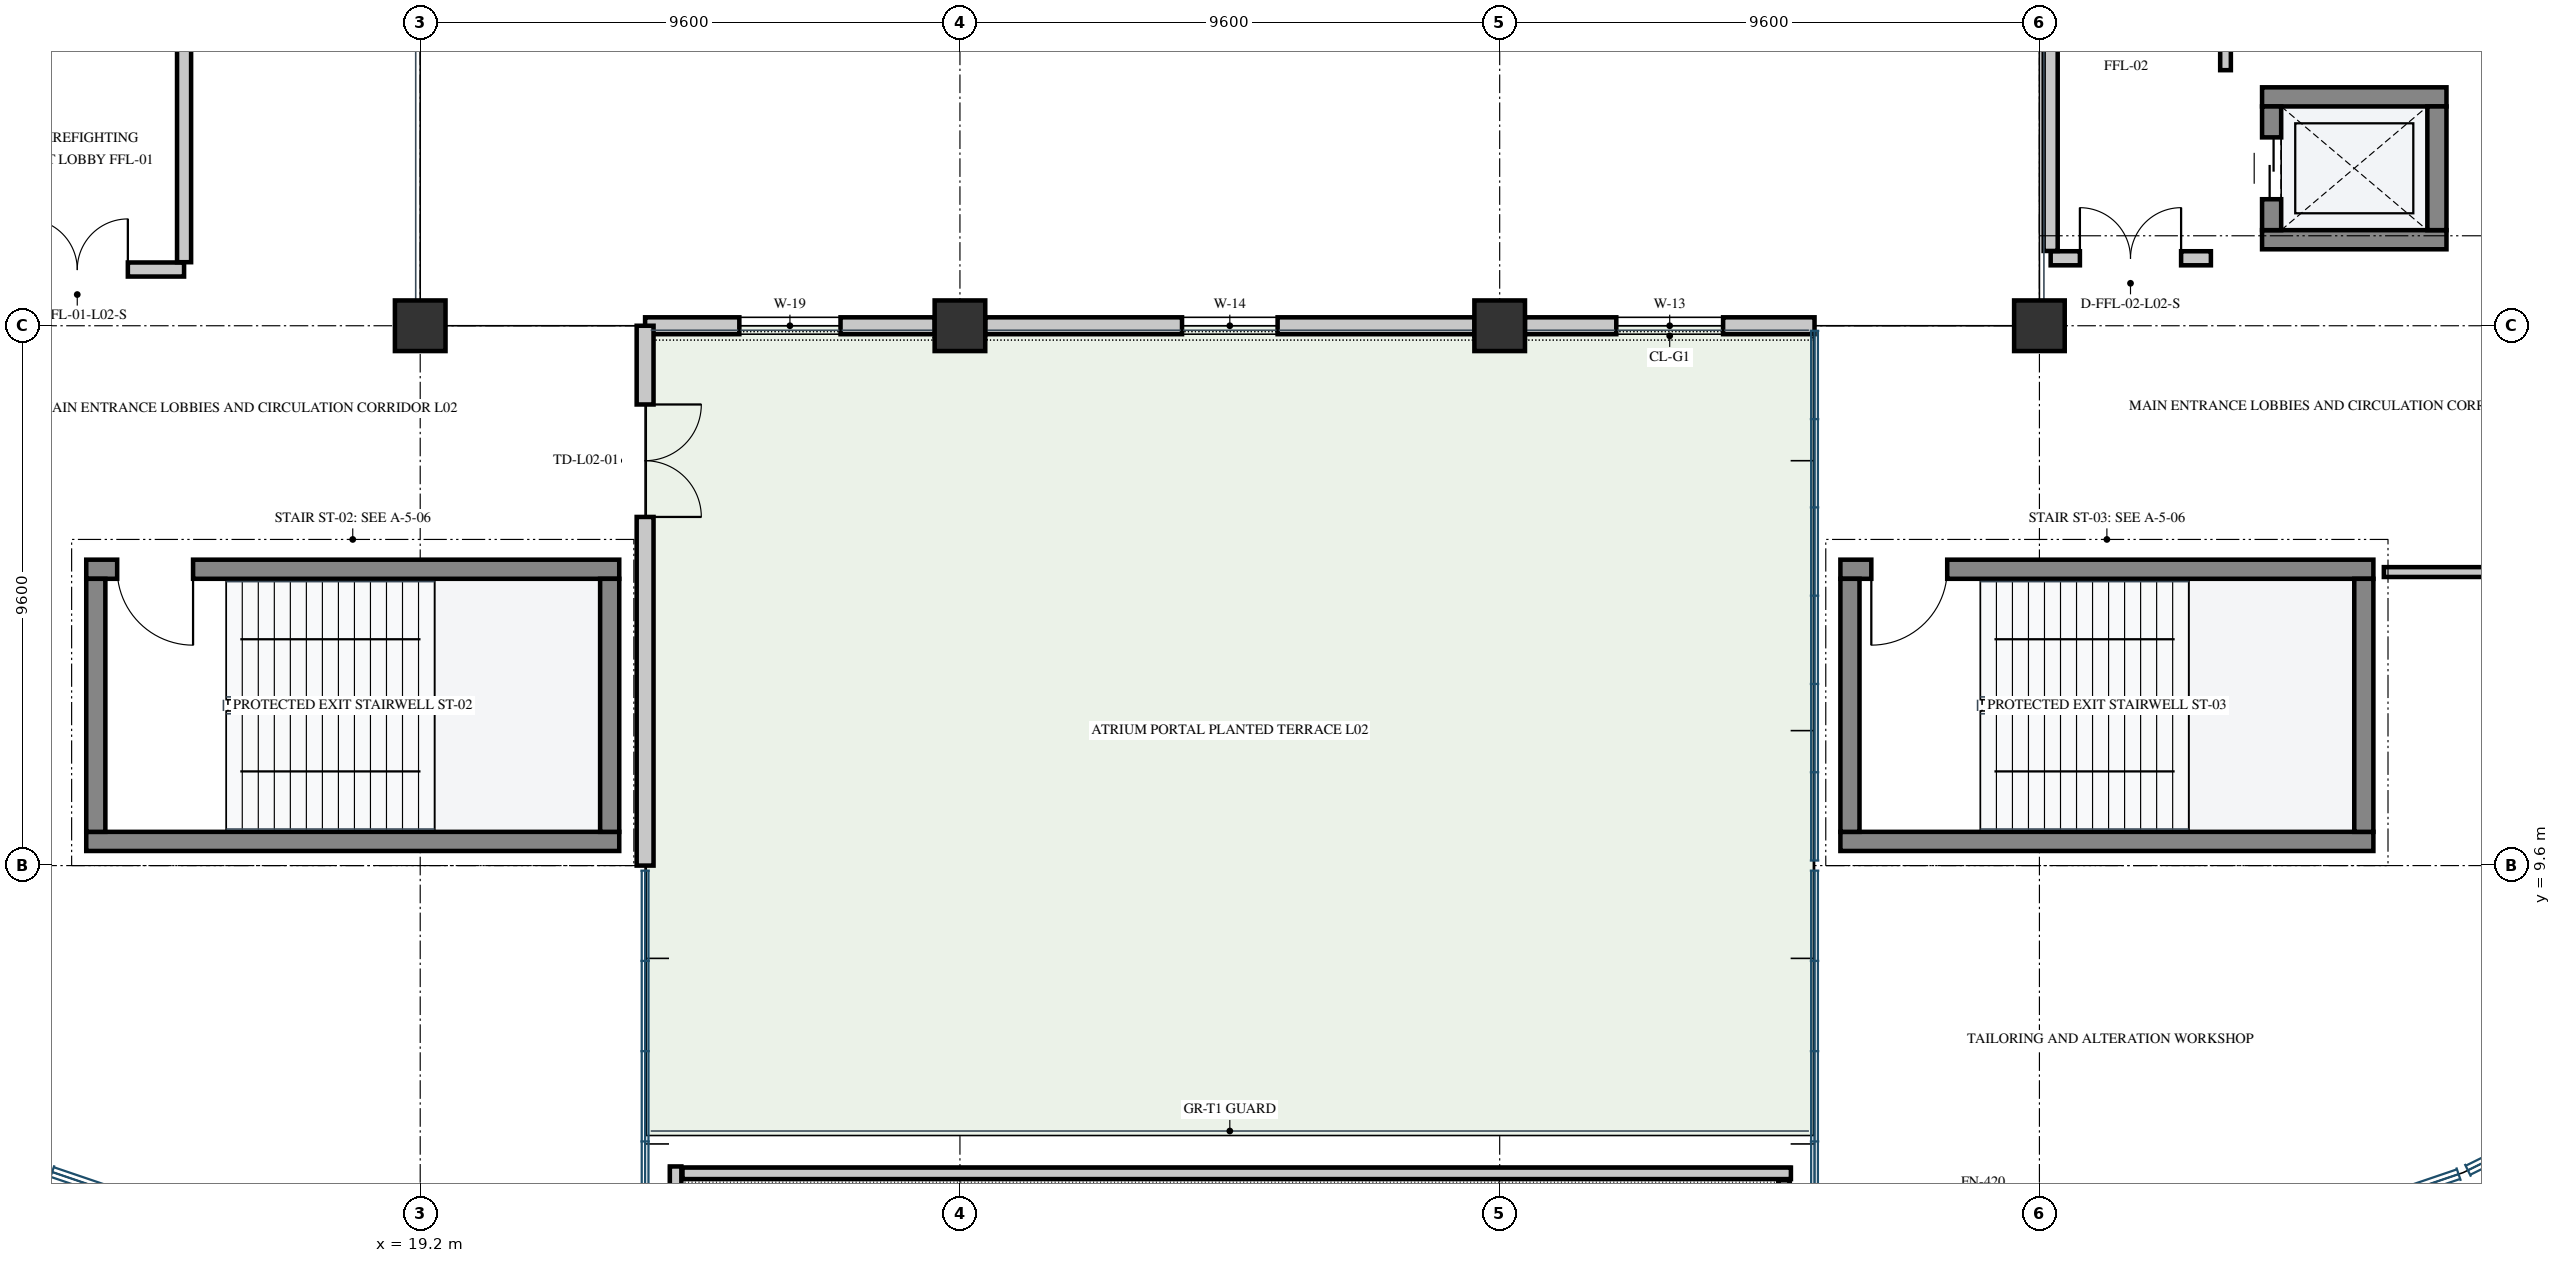
"""IFC4 building model, lengths in metres.
Left out: names, types, materials, properties, quantities, classifications, styles, units other than length and angle.
Written with IfcOpenShell. Run it as: python <this file> out.ifc"""

import sys

from ifc_helpers import new_model, si_unit, direction, frame, frame_2d, origin, origin_2d, place, context, subcontext, project, spatial, rectangle, extrude, element, fill, save


model = new_model("IFC4")
c1 = context("Model", 3, precision=1e-05, world=origin(), true_north=direction((0.0, 1.0)))
c2 = subcontext(c1, "Body", "Model", "MODEL_VIEW")
j1 = project(units=[si_unit("LENGTHUNIT", "METRE"), si_unit("PLANEANGLEUNIT", "RADIAN")], contexts=[c1])
p1 = place(None, origin())
s1 = spatial("IfcSite", under=j1, at=p1, CompositionType="ELEMENT")
p2 = place(p1, origin())
s2 = spatial("IfcBuilding", under=s1, at=p2, CompositionType="ELEMENT")
p3 = place(p2, frame((0.0, 0.0, 10.2)))
s3 = spatial("IfcBuildingStorey", under=s2, at=p3, CompositionType="ELEMENT", Elevation=10.2)
for number, where, z_axis, x_axis in (
    (1, (19.2, 19.2, 0.0), (0.0, 0.0, 1.0), (1.0, 0.0, 0.0)),
    (2, (28.8, 19.2, 0.0), (0.0, 0.0, 1.0), (1.0, 0.0, 0.0)),
    (3, (38.4, 19.2, 0.0), (0.0, 0.0, 1.0), (1.0, 0.0, 0.0)),
    (4, (48.0, 19.2, 0.0), (0.0, 0.0, 1.0), (1.0, 0.0, 0.0)),
):
    element("IfcColumn", number, at=place(p3, frame(where, z_axis=z_axis, x_axis=x_axis)), inside=s3, PredefinedType="COLUMN", context=c2, shape_type="SweptSolid", body=[
        extrude(rectangle(XDim=0.9, YDim=0.9, at=origin_2d()), origin(), (0.0, 0.0, 1.0), 4.8),
    ])
p4 = place(p3, frame((44.0, 19.2, 0.0), z_axis=(0.0, 0.0, 1.0), x_axis=(-1.0, 0.0, 0.0)))
e5 = element("IfcWall", 5, at=p4, inside=s3, PredefinedType="SOLIDWALL", context=c2, shape_type="SweptSolid", body=[
    extrude(rectangle(XDim=5.152, YDim=0.3, at=frame_2d((2.576, 0.0))), origin(), (0.0, 0.0, 1.0), 3.455),
])
p5 = place(p4, frame((1.626, 0.0, 1.1)))
e6 = element("IfcOpeningElement", 6, at=p5, cuts=e5, PredefinedType="OPENING", context=c2, shape_type="SweptSolid", body=[
    extrude(rectangle(XDim=1.9, YDim=1.85, at=frame_2d((0.95, 0.925))), frame((0.0, 0.162, 0.0), z_axis=(0.0, -1.0, 0.0), x_axis=(1.0, 0.0, 0.0)), (0.0, 0.0, 1.0), 0.324),
])
p6 = place(p3, frame((37.952, 19.2, 0.0), z_axis=(0.0, 0.0, 1.0), x_axis=(-1.0, 0.0, 0.0)))
e7 = element("IfcWall", 7, at=p6, inside=s3, PredefinedType="SOLIDWALL", context=c2, shape_type="SweptSolid", body=[
    extrude(rectangle(XDim=8.704, YDim=0.3, at=frame_2d((4.352, 0.0))), origin(), (0.0, 0.0, 1.0), 3.455),
])
p7 = place(p6, frame((3.502, 0.0, 1.1)))
e8 = element("IfcOpeningElement", 8, at=p7, cuts=e7, PredefinedType="OPENING", context=c2, shape_type="SweptSolid", body=[
    extrude(rectangle(XDim=1.7, YDim=1.8, at=frame_2d((0.85, 0.9))), frame((0.0, 0.162, 0.0), z_axis=(0.0, -1.0, 0.0), x_axis=(1.0, 0.0, 0.0)), (0.0, 0.0, 1.0), 0.324),
])
p8 = place(p3, frame((28.352, 19.2, 0.0), z_axis=(0.0, 0.0, 1.0), x_axis=(-1.0, 0.0, 0.0)))
e9 = element("IfcWall", 9, at=p8, inside=s3, PredefinedType="SOLIDWALL", context=c2, shape_type="SweptSolid", body=[
    extrude(rectangle(XDim=5.152, YDim=0.3, at=frame_2d((2.576, 0.0))), origin(), (0.0, 0.0, 1.0), 3.455),
])
p9 = place(p8, frame((1.676, 0.0, 1.2)))
e10 = element("IfcOpeningElement", 10, at=p9, cuts=e9, PredefinedType="OPENING", context=c2, shape_type="SweptSolid", body=[
    extrude(rectangle(XDim=1.8, YDim=1.5, at=frame_2d((0.9, 0.75))), frame((0.0, 0.162, 0.0), z_axis=(0.0, -1.0, 0.0), x_axis=(1.0, 0.0, 0.0)), (0.0, 0.0, 1.0), 0.324),
])
p10 = place(p3, frame((23.2, 19.2, 0.0), z_axis=(0.0, 0.0, 1.0), x_axis=(0.0, -1.0, 0.0)))
e11 = element("IfcWall", 11, at=p10, inside=s3, PredefinedType="SOLIDWALL", context=c2, shape_type="SweptSolid", body=[
    extrude(rectangle(XDim=9.6, YDim=0.3, at=frame_2d((4.8, 0.0))), origin(), (0.0, 0.0, 1.0), 3.455),
])
p11 = place(p10, frame((1.4, 0.0, 0.0)))
e12 = element("IfcOpeningElement", 12, at=p11, cuts=e11, PredefinedType="OPENING", context=c2, shape_type="SweptSolid", body=[
    extrude(rectangle(XDim=2.0, YDim=2.4, at=frame_2d((1.0, 1.2))), frame((0.0, 0.162, 0.0), z_axis=(0.0, -1.0, 0.0), x_axis=(1.0, 0.0, 0.0)), (0.0, 0.0, 1.0), 0.324),
])
p12 = place(p3, frame((23.742, 2.58, 0.0), z_axis=(0.0, 0.0, 1.0), x_axis=(0.0, 1.0, 0.0)))
e13 = element("IfcWall", 13, at=p12, inside=s3, PredefinedType="PARAPET", context=c2, shape_type="SweptSolid", body=[
    extrude(rectangle(XDim=1.67, YDim=0.205, at=frame_2d((0.835, 0.0))), origin(), (0.0, 0.0, 1.0), 1.2),
])
p13 = place(p3, frame((23.865, 4.127, 0.0), z_axis=(0.0, 0.0, 1.0), x_axis=(1.0, 0.0, 0.0)))
e14 = element("IfcWall", 14, at=p13, inside=s3, PredefinedType="PARAPET", context=c2, shape_type="SweptSolid", body=[
    extrude(rectangle(XDim=19.715, YDim=0.205, at=frame_2d((9.857, 0.0))), origin(), (0.0, 0.0, 1.0), 1.2),
])
p14 = place(p3, frame((43.458, 4.005, 0.0), z_axis=(0.0, 0.0, 1.0), x_axis=(0.0, -1.0, 0.0)))
e15 = element("IfcWall", 15, at=p14, inside=s3, PredefinedType="PARAPET", context=c2, shape_type="SweptSolid", body=[
    extrude(rectangle(XDim=1.425, YDim=0.205, at=frame_2d((0.712, 0.0))), origin(), (0.0, 0.0, 1.0), 1.2),
])
p15 = place(p3, frame((55.756, 3.643, 0.0), z_axis=(0.0, 0.0, 1.0), x_axis=(0.896882709026, 0.442268477568, 0.0)))
e16 = element("IfcWall", 16, at=p15, inside=s3, PredefinedType="PARAPET", context=c2, shape_type="SweptSolid", body=[
    extrude(rectangle(XDim=2.017, YDim=0.205, at=frame_2d((1.009, 0.0))), origin(), (0.0, 0.0, 1.0), 1.2),
])
p16 = place(p3, frame((13.26, 10.03, 0.0), z_axis=(0.0, 0.0, 1.0), x_axis=(1.0, 0.0, 0.0)))
e17 = element("IfcWall", 17, at=p16, inside=s3, PredefinedType="SHEAR", context=c2, shape_type="SweptSolid", body=[
    extrude(rectangle(XDim=9.48, YDim=0.34, at=frame_2d((4.74, 0.0))), origin(), (0.0, 0.0, 1.0), 4.515),
])
p17 = place(p3, frame((13.26, 14.87, 0.0), z_axis=(0.0, 0.0, 1.0), x_axis=(1.0, 0.0, 0.0)))
e18 = element("IfcWall", 18, at=p17, inside=s3, PredefinedType="SHEAR", context=c2, shape_type="SweptSolid", body=[
    extrude(rectangle(XDim=9.48, YDim=0.34, at=frame_2d((4.74, 0.0))), origin(), (0.0, 0.0, 1.0), 4.515),
])
p18 = place(p17, frame((0.55, 0.0, 0.0)))
e19 = element("IfcOpeningElement", 19, at=p18, cuts=e18, PredefinedType="OPENING", context=c2, shape_type="SweptSolid", body=[
    extrude(rectangle(XDim=1.35, YDim=2.2, at=frame_2d((0.675, 1.1))), frame((0.0, 0.182, 0.0), z_axis=(0.0, -1.0, 0.0), x_axis=(1.0, 0.0, 0.0)), (0.0, 0.0, 1.0), 0.364),
])
for number, where, z_axis, x_axis in (
    (20, (22.57, 10.2, 0.0), (0.0, 0.0, 1.0), (0.0, 1.0, 0.0)),
    (21, (13.43, 10.2, 0.0), (0.0, 0.0, 1.0), (0.0, 1.0, 0.0)),
):
    element("IfcWall", number, at=place(p3, frame(where, z_axis=z_axis, x_axis=x_axis)), inside=s3, PredefinedType="SHEAR", context=c2, shape_type="SweptSolid", body=[
        extrude(rectangle(XDim=4.5, YDim=0.34, at=frame_2d((2.25, 0.0))), origin(), (0.0, 0.0, 1.0), 4.515),
    ])
p19 = place(p3, frame((44.46, 10.03, 0.0), z_axis=(0.0, 0.0, 1.0), x_axis=(1.0, 0.0, 0.0)))
e22 = element("IfcWall", 22, at=p19, inside=s3, PredefinedType="SHEAR", context=c2, shape_type="SweptSolid", body=[
    extrude(rectangle(XDim=9.48, YDim=0.34, at=frame_2d((4.74, 0.0))), origin(), (0.0, 0.0, 1.0), 4.515),
])
p20 = place(p3, frame((44.46, 14.87, 0.0), z_axis=(0.0, 0.0, 1.0), x_axis=(1.0, 0.0, 0.0)))
e23 = element("IfcWall", 23, at=p20, inside=s3, PredefinedType="SHEAR", context=c2, shape_type="SweptSolid", body=[
    extrude(rectangle(XDim=9.48, YDim=0.34, at=frame_2d((4.74, 0.0))), origin(), (0.0, 0.0, 1.0), 4.515),
])
p21 = place(p20, frame((0.55, 0.0, 0.0)))
e24 = element("IfcOpeningElement", 24, at=p21, cuts=e23, PredefinedType="OPENING", context=c2, shape_type="SweptSolid", body=[
    extrude(rectangle(XDim=1.35, YDim=2.2, at=frame_2d((0.675, 1.1))), frame((0.0, 0.182, 0.0), z_axis=(0.0, -1.0, 0.0), x_axis=(1.0, 0.0, 0.0)), (0.0, 0.0, 1.0), 0.364),
])
for number, where, z_axis, x_axis in (
    (25, (53.77, 10.2, 0.0), (0.0, 0.0, 1.0), (0.0, 1.0, 0.0)),
    (26, (44.63, 10.2, 0.0), (0.0, 0.0, 1.0), (0.0, 1.0, 0.0)),
):
    element("IfcWall", number, at=place(p3, frame(where, z_axis=z_axis, x_axis=x_axis)), inside=s3, PredefinedType="SHEAR", context=c2, shape_type="SweptSolid", body=[
        extrude(rectangle(XDim=4.5, YDim=0.34, at=frame_2d((2.25, 0.0))), origin(), (0.0, 0.0, 1.0), 4.515),
    ])
for number, where, z_axis, x_axis in (
    (27, (51.96, 20.73, 0.0), (0.0, 0.0, 1.0), (1.0, 0.0, 0.0)),
    (28, (51.96, 23.27, 0.0), (0.0, 0.0, 1.0), (1.0, 0.0, 0.0)),
):
    element("IfcWall", number, at=place(p3, frame(where, z_axis=z_axis, x_axis=x_axis)), inside=s3, PredefinedType="SHEAR", context=c2, shape_type="SweptSolid", body=[
        extrude(rectangle(XDim=3.28, YDim=0.34, at=frame_2d((1.64, 0.0))), origin(), (0.0, 0.0, 1.0), 4.515),
    ])
p22 = place(p3, frame((52.13, 20.9, 0.0), z_axis=(0.0, 0.0, 1.0), x_axis=(0.0, 1.0, 0.0)))
e29 = element("IfcWall", 29, at=p22, inside=s3, PredefinedType="SHEAR", context=c2, shape_type="SweptSolid", body=[
    extrude(rectangle(XDim=2.2, YDim=0.34, at=frame_2d((1.1, 0.0))), origin(), (0.0, 0.0, 1.0), 4.515),
])
p23 = place(p22, frame((0.55, 0.0, 0.0)))
e30 = element("IfcOpeningElement", 30, at=p23, cuts=e29, PredefinedType="OPENING", context=c2, shape_type="SweptSolid", body=[
    extrude(rectangle(XDim=1.1, YDim=2.15, at=frame_2d((0.55, 1.075))), frame((0.0, 0.182, 0.0), z_axis=(0.0, -1.0, 0.0), x_axis=(1.0, 0.0, 0.0)), (0.0, 0.0, 1.0), 0.364),
])
p24 = place(p3, frame((55.07, 20.9, 0.0), z_axis=(0.0, 0.0, 1.0), x_axis=(0.0, 1.0, 0.0)))
e31 = element("IfcWall", 31, at=p24, inside=s3, PredefinedType="SHEAR", context=c2, shape_type="SweptSolid", body=[
    extrude(rectangle(XDim=2.2, YDim=0.34, at=frame_2d((1.1, 0.0))), origin(), (0.0, 0.0, 1.0), 4.515),
])
p25 = place(p3, frame((11.2, 20.2, 0.0), z_axis=(0.0, 0.0, 1.0), x_axis=(1.0, 0.0, 0.0)))
e32 = element("IfcWall", 32, at=p25, inside=s3, PredefinedType="PARTITIONING", context=c2, shape_type="SweptSolid", body=[
    extrude(rectangle(XDim=3.8, YDim=0.25, at=frame_2d((1.9, 0.0))), origin(), (0.0, 0.0, 1.0), 4.515),
])
p26 = place(p25, frame((1.0, 0.0, 0.0)))
e33 = element("IfcOpeningElement", 33, at=p26, cuts=e32, PredefinedType="OPENING", context=c2, shape_type="SweptSolid", body=[
    extrude(rectangle(XDim=1.8, YDim=2.25, at=frame_2d((0.9, 1.125))), frame((0.0, 0.137, 0.0), z_axis=(0.0, -1.0, 0.0), x_axis=(1.0, 0.0, 0.0)), (0.0, 0.0, 1.0), 0.274),
])
p27 = place(p3, frame((15.0, 20.33, 0.0), z_axis=(0.0, 0.0, 1.0), x_axis=(0.0, 1.0, 0.0)))
e34 = element("IfcWall", 34, at=p27, inside=s3, PredefinedType="PARTITIONING", context=c2, shape_type="SweptSolid", body=[
    extrude(rectangle(XDim=7.14, YDim=0.25, at=frame_2d((3.57, 0.0))), origin(), (0.0, 0.0, 1.0), 4.515),
])
p28 = place(p3, frame((48.2, 20.4, 0.0), z_axis=(0.0, 0.0, 1.0), x_axis=(1.0, 0.0, 0.0)))
e35 = element("IfcWall", 35, at=p28, inside=s3, PredefinedType="PARTITIONING", context=c2, shape_type="SweptSolid", body=[
    extrude(rectangle(XDim=2.85, YDim=0.25, at=frame_2d((1.425, 0.0))), origin(), (0.0, 0.0, 1.0), 3.455),
])
p29 = place(p28, frame((0.52, 0.0, 0.0)))
e36 = element("IfcOpeningElement", 36, at=p29, cuts=e35, PredefinedType="OPENING", context=c2, shape_type="SweptSolid", body=[
    extrude(rectangle(XDim=1.8, YDim=2.25, at=frame_2d((0.9, 1.125))), frame((0.0, 0.137, 0.0), z_axis=(0.0, -1.0, 0.0), x_axis=(1.0, 0.0, 0.0)), (0.0, 0.0, 1.0), 0.274),
])
p30 = place(p3, frame((48.2, 20.53, 0.0), z_axis=(0.0, 0.0, 1.0), x_axis=(0.0, 1.0, 0.0)))
e37 = element("IfcWall", 37, at=p30, inside=s3, PredefinedType="PARTITIONING", context=c2, shape_type="SweptSolid", body=[
    extrude(rectangle(XDim=7.14, YDim=0.25, at=frame_2d((3.57, 0.0))), origin(), (0.0, 0.0, 1.0), 3.455),
])
p31 = place(p3, frame((51.31, 23.745, 0.0), z_axis=(0.0, 0.0, 1.0), x_axis=(0.0, 1.0, 0.0)))
e38 = element("IfcWall", 38, at=p31, inside=s3, PredefinedType="PARTITIONING", context=c2, shape_type="SweptSolid", body=[
    extrude(rectangle(XDim=4.315, YDim=0.19, at=frame_2d((2.158, 0.0))), origin(), (0.0, 0.0, 1.0), 4.515),
])
p32 = place(p3, frame((54.126, 14.82, 0.0), z_axis=(0.0, 0.0, 1.0), x_axis=(1.0, 0.0, 0.0)))
e39 = element("IfcWall", 39, at=p32, inside=s3, PredefinedType="PARTITIONING", context=c2, shape_type="SweptSolid", body=[
    extrude(rectangle(XDim=10.193, YDim=0.175, at=frame_2d((5.097, 0.0))), origin(), (0.0, 0.0, 1.0), 3.455),
])
p33 = place(p32, frame((4.234, 0.0, 0.0)))
e40 = element("IfcOpeningElement", 40, at=p33, cuts=e39, PredefinedType="OPENING", context=c2, shape_type="SweptSolid", body=[
    extrude(rectangle(XDim=1.15, YDim=2.2, at=frame_2d((0.575, 1.1))), frame((0.0, 0.1, 0.0), z_axis=(0.0, -1.0, 0.0), x_axis=(1.0, 0.0, 0.0)), (0.0, 0.0, 1.0), 0.199),
])
p34 = place(p5, origin())
e41 = element("IfcWindow", 41, at=p34, inside=s3, PartitioningType="SINGLE_PANEL", PredefinedType="WINDOW", context=c2, shape_type="SweptSolid", body=[
    extrude(rectangle(XDim=1.9, YDim=1.85, at=frame_2d((0.95, 0.925))), frame((0.0, 0.03, 0.0), z_axis=(0.0, -1.0, 0.0), x_axis=(1.0, 0.0, 0.0)), (0.0, 0.0, 1.0), 0.06),
])
fill(e6, e41)
p35 = place(p7, origin())
e42 = element("IfcWindow", 42, at=p35, inside=s3, PartitioningType="SINGLE_PANEL", PredefinedType="WINDOW", context=c2, shape_type="SweptSolid", body=[
    extrude(rectangle(XDim=1.7, YDim=1.8, at=frame_2d((0.85, 0.9))), frame((0.0, 0.03, 0.0), z_axis=(0.0, -1.0, 0.0), x_axis=(1.0, 0.0, 0.0)), (0.0, 0.0, 1.0), 0.06),
])
fill(e8, e42)
p36 = place(p9, origin())
e43 = element("IfcWindow", 43, at=p36, inside=s3, PartitioningType="SINGLE_PANEL", PredefinedType="WINDOW", context=c2, shape_type="SweptSolid", body=[
    extrude(rectangle(XDim=1.8, YDim=1.5, at=frame_2d((0.9, 0.75))), frame((0.0, 0.03, 0.0), z_axis=(0.0, -1.0, 0.0), x_axis=(1.0, 0.0, 0.0)), (0.0, 0.0, 1.0), 0.06),
])
fill(e10, e43)
p37 = place(p11, origin())
e44 = element("IfcDoor", 44, at=p37, inside=s3, OperationType="DOUBLE_DOOR_SINGLE_SWING", PredefinedType="DOOR", context=c2, shape_type="SweptSolid", body=[
    extrude(rectangle(XDim=2.0, YDim=2.4, at=frame_2d((1.0, 1.2))), frame((0.0, 0.025, 0.0), z_axis=(0.0, -1.0, 0.0), x_axis=(1.0, 0.0, 0.0)), (0.0, 0.0, 1.0), 0.05),
])
fill(e12, e44)
p38 = place(p18, frame((1.35, 0.0, 0.0), z_axis=(0.0, 0.0, 1.0), x_axis=(-1.0, 0.0, 0.0)))
e45 = element("IfcDoor", 45, at=p38, inside=s3, OperationType="SINGLE_SWING_LEFT", PredefinedType="DOOR", context=c2, shape_type="SweptSolid", body=[
    extrude(rectangle(XDim=1.35, YDim=2.2, at=frame_2d((0.675, 1.1))), frame((0.0, 0.025, 0.0), z_axis=(0.0, -1.0, 0.0), x_axis=(1.0, 0.0, 0.0)), (0.0, 0.0, 1.0), 0.05),
])
fill(e19, e45)
p39 = place(p21, frame((1.35, 0.0, 0.0), z_axis=(0.0, 0.0, 1.0), x_axis=(-1.0, 0.0, 0.0)))
e46 = element("IfcDoor", 46, at=p39, inside=s3, OperationType="SINGLE_SWING_RIGHT", PredefinedType="DOOR", context=c2, shape_type="SweptSolid", body=[
    extrude(rectangle(XDim=1.35, YDim=2.2, at=frame_2d((0.675, 1.1))), frame((0.0, 0.025, 0.0), z_axis=(0.0, -1.0, 0.0), x_axis=(1.0, 0.0, 0.0)), (0.0, 0.0, 1.0), 0.05),
])
fill(e24, e46)
p40 = place(p23, origin())
e47 = element("IfcDoor", 47, at=p40, inside=s3, OperationType="DOUBLE_DOOR_SLIDING", PredefinedType="DOOR", context=c2, shape_type="SweptSolid", body=[
    extrude(rectangle(XDim=1.1, YDim=2.15, at=frame_2d((0.55, 1.075))), frame((0.0, 0.025, 0.0), z_axis=(0.0, -1.0, 0.0), x_axis=(1.0, 0.0, 0.0)), (0.0, 0.0, 1.0), 0.05),
])
fill(e30, e47)
p41 = place(p26, origin())
e48 = element("IfcDoor", 48, at=p41, inside=s3, OperationType="DOUBLE_DOOR_SINGLE_SWING", PredefinedType="DOOR", context=c2, shape_type="SweptSolid", body=[
    extrude(rectangle(XDim=1.8, YDim=2.25, at=frame_2d((0.9, 1.125))), frame((0.0, 0.025, 0.0), z_axis=(0.0, -1.0, 0.0), x_axis=(1.0, 0.0, 0.0)), (0.0, 0.0, 1.0), 0.05),
])
fill(e33, e48)
p42 = place(p29, origin())
e49 = element("IfcDoor", 49, at=p42, inside=s3, OperationType="DOUBLE_DOOR_SINGLE_SWING", PredefinedType="DOOR", context=c2, shape_type="SweptSolid", body=[
    extrude(rectangle(XDim=1.8, YDim=2.25, at=frame_2d((0.9, 1.125))), frame((0.0, 0.025, 0.0), z_axis=(0.0, -1.0, 0.0), x_axis=(1.0, 0.0, 0.0)), (0.0, 0.0, 1.0), 0.05),
])
fill(e36, e49)
save(model, sys.argv[1])
